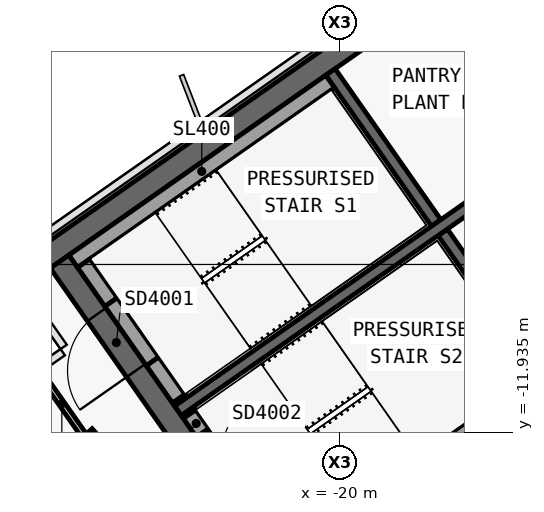
"""IFC4 building model, lengths in metres.
Left out: names, types, materials, properties, quantities, classifications, styles, units other than length and angle.
Written with IfcOpenShell. Run it as: python <this file> out.ifc"""

import sys

from ifc_helpers import new_model, si_unit, direction, frame, frame_2d, origin, place, context, subcontext, project, spatial, polyline, rectangle, outline, extrude, element, fill, save


model = new_model("IFC4")
c1 = context("Model", 3, precision=1e-05, world=origin(), true_north=direction((0.0, 1.0)))
c2 = subcontext(c1, "Body", "Model", "MODEL_VIEW")
j1 = project(units=[si_unit("LENGTHUNIT", "METRE"), si_unit("PLANEANGLEUNIT", "RADIAN")], contexts=[c1])
p1 = place(None, origin())
s1 = spatial("IfcSite", under=j1, at=p1, CompositionType="ELEMENT")
p2 = place(p1, origin())
s2 = spatial("IfcBuilding", under=s1, at=p2, CompositionType="ELEMENT")
p3 = place(p2, frame((0.0, 0.0, 219.4)))
s3 = spatial("IfcBuildingStorey", under=s2, at=p3, CompositionType="ELEMENT", Elevation=219.4)
p4 = place(p3, frame((-0.028, 12.066, 0.0), z_axis=(0.0, 0.0, 1.0), x_axis=(-0.819151382952, -0.573577380837, 0.0)))
e1 = element("IfcWall", 1, at=p4, inside=s3, PredefinedType="SHEAR", context=c2, shape_type="SweptSolid", body=[
    extrude(outline(polyline([(33.898, 0.3), (0.42, 0.3), (0.0, -0.3), (33.898, -0.3), (33.898, 0.3)])), origin(), (0.0, 0.0, 1.0), 6.0),
])
p5 = place(p3, frame((-0.028, -0.874, 0.0), z_axis=(0.0, 0.0, 1.0), x_axis=(-0.819150035022, -0.573579305871, 0.0)))
e2 = element("IfcWall", 2, at=p5, inside=s3, PredefinedType="SHEAR", context=c2, shape_type="SweptSolid", body=[
    extrude(outline(polyline([(26.476, 0.3), (0.42, 0.3), (0.0, -0.3), (26.476, -0.3), (26.476, 0.3)])), origin(), (0.0, 0.0, 1.0), 6.0),
])
p6 = place(p5, frame((2.976, 0.0, 0.0)))
e3 = element("IfcOpeningElement", 3, at=p6, cuts=e2, PredefinedType="OPENING", context=c2, shape_type="SweptSolid", body=[
    extrude(rectangle(XDim=2.4, YDim=2.1, at=frame_2d((1.2, 1.05))), frame((0.0, 0.31, 0.0), z_axis=(0.0, -1.0, 0.0), x_axis=(1.0, 0.0, 0.0)), (0.0, 0.0, 1.0), 0.62),
])
p7 = place(p5, frame((11.776, 0.0, 0.0)))
e4 = element("IfcOpeningElement", 4, at=p7, cuts=e2, PredefinedType="OPENING", context=c2, shape_type="SweptSolid", body=[
    extrude(rectangle(XDim=2.4, YDim=2.1, at=frame_2d((1.2, 1.05))), frame((0.0, 0.31, 0.0), z_axis=(0.0, -1.0, 0.0), x_axis=(1.0, 0.0, 0.0)), (0.0, 0.0, 1.0), 0.62),
])
p8 = place(p3, frame((-21.642, -15.642, 0.0), z_axis=(0.0, 0.0, 1.0), x_axis=(-0.573586866468, 0.819144740944, 0.0)))
e5 = element("IfcWall", 5, at=p8, inside=s3, PredefinedType="SHEAR", context=c2, shape_type="SweptSolid", body=[
    extrude(outline(polyline([(0.0, 0.3), (0.0, -0.3), (10.0, -0.3), (10.0, 0.3), (0.0, 0.3)])), origin(), (0.0, 0.0, 1.0), 6.0),
])
p9 = place(p8, frame((6.5, 0.0, 0.0)))
e6 = element("IfcOpeningElement", 6, at=p9, cuts=e5, PredefinedType="OPENING", context=c2, shape_type="SweptSolid", body=[
    extrude(rectangle(XDim=1.8, YDim=2.1, at=frame_2d((0.9, 1.05))), frame((0.0, 0.31, 0.0), z_axis=(0.0, -1.0, 0.0), x_axis=(1.0, 0.0, 0.0)), (0.0, 0.0, 1.0), 0.62),
])
p10 = place(p8, frame((2.3, 0.0, 0.0)))
e7 = element("IfcOpeningElement", 7, at=p10, cuts=e5, PredefinedType="OPENING", context=c2, shape_type="SweptSolid", body=[
    extrude(rectangle(XDim=1.8, YDim=2.1, at=frame_2d((0.9, 1.05))), frame((0.0, 0.31, 0.0), z_axis=(0.0, -1.0, 0.0), x_axis=(1.0, 0.0, 0.0)), (0.0, 0.0, 1.0), 0.62),
])
p11 = place(p3, frame((-14.515, -10.652, 0.0), z_axis=(0.0, 0.0, 1.0), x_axis=(-0.573560315113, 0.819163332265, 0.0)))
e8 = element("IfcWall", 8, at=p11, inside=s3, PredefinedType="SHEAR", context=c2, shape_type="SweptSolid", body=[
    extrude(outline(polyline([(4.85, 0.15), (0.0, 0.15), (0.0, -0.15), (4.85, -0.15), (4.85, 0.15)])), origin(), (0.0, 0.0, 1.0), 6.0),
])
p12 = place(p3, frame((-17.469, -6.433, 0.0), z_axis=(0.0, 0.0, 1.0), x_axis=(-0.573594092424, 0.81913968109, 0.0)))
e9 = element("IfcWall", 9, at=p12, inside=s3, PredefinedType="SHEAR", context=c2, shape_type="SweptSolid", body=[
    extrude(outline(polyline([(4.85, -0.15), (4.85, 0.15), (0.0, 0.15), (0.0, -0.15), (4.85, -0.15)])), origin(), (0.0, 0.0, 1.0), 6.0),
])
p13 = place(p3, frame((-2.638, 3.768, 0.0), z_axis=(0.0, 0.0, 1.0), x_axis=(-0.819155014212, -0.573572194837, 0.0)))
e10 = element("IfcWall", 10, at=p13, inside=s3, PredefinedType="SHEAR", context=c2, shape_type="SweptSolid", body=[
    extrude(outline(polyline([(26.4, 0.15), (0.0, 0.15), (0.0, -0.15), (26.4, -0.15), (26.4, 0.15)])), origin(), (0.0, 0.0, 1.0), 6.0),
])
p14 = place(p13, frame((1.169, 0.0, 0.0)))
e11 = element("IfcOpeningElement", 11, at=p14, cuts=e10, PredefinedType="OPENING", context=c2, shape_type="SweptSolid", body=[
    extrude(rectangle(XDim=1.1, YDim=2.1, at=frame_2d((0.55, 1.05))), frame((0.0, 0.16, 0.0), z_axis=(0.0, -1.0, 0.0), x_axis=(1.0, 0.0, 0.0)), (0.0, 0.0, 1.0), 0.32),
])
p15 = place(p13, frame((3.206, 0.0, 0.0)))
e12 = element("IfcOpeningElement", 12, at=p15, cuts=e10, PredefinedType="OPENING", context=c2, shape_type="SweptSolid", body=[
    extrude(rectangle(XDim=1.1, YDim=2.1, at=frame_2d((0.55, 1.05))), frame((0.0, 0.16, 0.0), z_axis=(0.0, -1.0, 0.0), x_axis=(1.0, 0.0, 0.0)), (0.0, 0.0, 1.0), 0.32),
])
p16 = place(p13, frame((5.244, 0.0, 0.0)))
e13 = element("IfcOpeningElement", 13, at=p16, cuts=e10, PredefinedType="OPENING", context=c2, shape_type="SweptSolid", body=[
    extrude(rectangle(XDim=1.1, YDim=2.1, at=frame_2d((0.55, 1.05))), frame((0.0, 0.16, 0.0), z_axis=(0.0, -1.0, 0.0), x_axis=(1.0, 0.0, 0.0)), (0.0, 0.0, 1.0), 0.32),
])
p17 = place(p13, frame((7.281, 0.0, 0.0)))
e14 = element("IfcOpeningElement", 14, at=p17, cuts=e10, PredefinedType="OPENING", context=c2, shape_type="SweptSolid", body=[
    extrude(rectangle(XDim=1.1, YDim=2.1, at=frame_2d((0.55, 1.05))), frame((0.0, 0.16, 0.0), z_axis=(0.0, -1.0, 0.0), x_axis=(1.0, 0.0, 0.0)), (0.0, 0.0, 1.0), 0.32),
])
p18 = place(p13, frame((9.688, 0.0, 0.0)))
e15 = element("IfcOpeningElement", 15, at=p18, cuts=e10, PredefinedType="OPENING", context=c2, shape_type="SweptSolid", body=[
    extrude(rectangle(XDim=1.1, YDim=2.1, at=frame_2d((0.55, 1.05))), frame((0.0, 0.16, 0.0), z_axis=(0.0, -1.0, 0.0), x_axis=(1.0, 0.0, 0.0)), (0.0, 0.0, 1.0), 0.32),
])
p19 = place(p13, frame((11.863, 0.0, 0.0)))
e16 = element("IfcOpeningElement", 16, at=p19, cuts=e10, PredefinedType="OPENING", context=c2, shape_type="SweptSolid", body=[
    extrude(rectangle(XDim=1.1, YDim=2.1, at=frame_2d((0.55, 1.05))), frame((0.0, 0.16, 0.0), z_axis=(0.0, -1.0, 0.0), x_axis=(1.0, 0.0, 0.0)), (0.0, 0.0, 1.0), 0.32),
])
p20 = place(p13, frame((15.175, 0.0, 0.0)))
e17 = element("IfcOpeningElement", 17, at=p20, cuts=e10, PredefinedType="OPENING", context=c2, shape_type="SweptSolid", body=[
    extrude(rectangle(XDim=1.0, YDim=2.1, at=frame_2d((0.5, 1.05))), frame((0.0, 0.16, 0.0), z_axis=(0.0, -1.0, 0.0), x_axis=(1.0, 0.0, 0.0)), (0.0, 0.0, 1.0), 0.32),
])
p21 = place(p3, frame((-20.259, -2.71, 0.0), z_axis=(0.0, 0.0, 1.0), x_axis=(-0.81914849389, -0.573581506813, 0.0)))
e18 = element("IfcWall", 18, at=p21, inside=s3, PredefinedType="SOLIDWALL", context=c2, shape_type="SweptSolid", body=[
    extrude(rectangle(XDim=8.25, YDim=0.4, at=frame_2d((4.125, 0.0))), origin(), (0.0, 0.0, 1.0), 5.72),
])
p22 = place(p3, frame((-24.244, -11.055, 0.0), z_axis=(0.0, 0.0, 1.0), x_axis=(-0.573571582932, 0.819155442668, 0.0)))
e19 = element("IfcWall", 19, at=p22, inside=s3, PredefinedType="SOLIDWALL", context=c2, shape_type="SweptSolid", body=[
    extrude(rectangle(XDim=1.2, YDim=0.4, at=frame_2d((0.6, 0.0))), origin(), (0.0, 0.0, 1.0), 5.72),
])
p23 = place(p3, frame((-26.022, -8.515, 0.0), z_axis=(0.0, 0.0, 1.0), x_axis=(-0.573619628835, 0.819121798889, 0.0)))
e20 = element("IfcWall", 20, at=p23, inside=s3, PredefinedType="SOLIDWALL", context=c2, shape_type="SweptSolid", body=[
    extrude(rectangle(XDim=1.25, YDim=0.4, at=frame_2d((0.625, 0.0))), origin(), (0.0, 0.0, 1.0), 5.72),
])
p24 = place(p3, frame((-24.932, -10.072, 2.15), z_axis=(0.0, 0.0, 1.0), x_axis=(-0.573591692345, 0.819141361715, 0.0)))
e21 = element("IfcWall", 21, at=p24, inside=s3, PredefinedType="SOLIDWALL", context=c2, shape_type="SweptSolid", body=[
    extrude(rectangle(XDim=1.9, YDim=0.4, at=frame_2d((0.95, 0.0))), origin(), (0.0, 0.0, 1.0), 3.57),
])
p25 = place(p3, frame((-14.753, -10.574, 0.0), z_axis=(0.0, 0.0, 1.0), x_axis=(-0.819158229677, -0.573567602601, 0.0)))
e22 = element("IfcWall", 22, at=p25, inside=s3, PredefinedType="SOLIDWALL", context=c2, shape_type="SweptSolid", body=[
    extrude(rectangle(XDim=8.25, YDim=0.4, at=frame_2d((4.125, 0.0))), origin(), (0.0, 0.0, 1.0), 5.72),
])
p26 = place(p3, frame((-23.613, -11.956, 0.0), z_axis=(0.0, 0.0, 1.0), x_axis=(-0.573435029941, 0.819251039936, 0.0)))
e23 = element("IfcWall", 23, at=p26, inside=s3, PredefinedType="SOLIDWALL", context=c2, shape_type="SweptSolid", body=[
    extrude(rectangle(XDim=0.6, YDim=0.4, at=frame_2d((0.3, 0.0))), origin(), (0.0, 0.0, 1.0), 5.72),
])
p27 = place(p3, frame((-22.523, -13.512, 2.15), z_axis=(0.0, 0.0, 1.0), x_axis=(-0.573591692345, 0.819141361715, 0.0)))
e24 = element("IfcWall", 24, at=p27, inside=s3, PredefinedType="SOLIDWALL", context=c2, shape_type="SweptSolid", body=[
    extrude(rectangle(XDim=1.9, YDim=0.4, at=frame_2d((0.95, 0.0))), origin(), (0.0, 0.0, 1.0), 3.57),
])
p28 = place(p3, frame((-26.746, -12.014, 0.0), z_axis=(0.0, 0.0, 1.0), x_axis=(-0.573568836472, 0.819157365729, 0.0)))
e25 = element("IfcWall", 25, at=p28, inside=s3, PredefinedType="PARTITIONING", context=c2, shape_type="SweptSolid", body=[
    extrude(rectangle(XDim=2.0, YDim=0.15, at=frame_2d((1.0, 0.0))), origin(), (0.0, 0.0, 1.0), 5.15),
])
p29 = place(p3, frame((-22.284, -16.826, 0.0), z_axis=(0.0, 0.0, 1.0), x_axis=(-0.656758142177, 0.754101281449, 0.0)))
e26 = element("IfcWall", 26, at=p29, inside=s3, PredefinedType="PARTITIONING", context=c2, shape_type="SweptSolid", body=[
    extrude(rectangle(XDim=6.539, YDim=0.15, at=frame_2d((3.269, 0.0))), origin(), (0.0, 0.0, 1.0), 5.72),
])
p30 = place(p3, frame((-24.001, -18.026, 0.0), z_axis=(0.0, 0.0, 1.0), x_axis=(-0.573591492816, 0.819141501433, 0.0)))
e27 = element("IfcWall", 27, at=p30, inside=s3, PredefinedType="PARTITIONING", context=c2, shape_type="SweptSolid", body=[
    extrude(rectangle(XDim=8.5, YDim=0.15, at=frame_2d((4.25, 0.0))), origin(), (0.0, 0.0, 1.0), 5.15),
])
p31 = place(p9, origin())
e28 = element("IfcDoor", 28, at=p31, inside=s3, OperationType="DOUBLE_DOOR_SINGLE_SWING", PredefinedType="DOOR", context=c2, shape_type="SweptSolid", body=[
    extrude(rectangle(XDim=1.8, YDim=2.1, at=frame_2d((0.9, 1.05))), frame((0.0, 0.025, 0.0), z_axis=(0.0, -1.0, 0.0), x_axis=(1.0, 0.0, 0.0)), (0.0, 0.0, 1.0), 0.05),
])
fill(e6, e28)
save(model, sys.argv[1])
